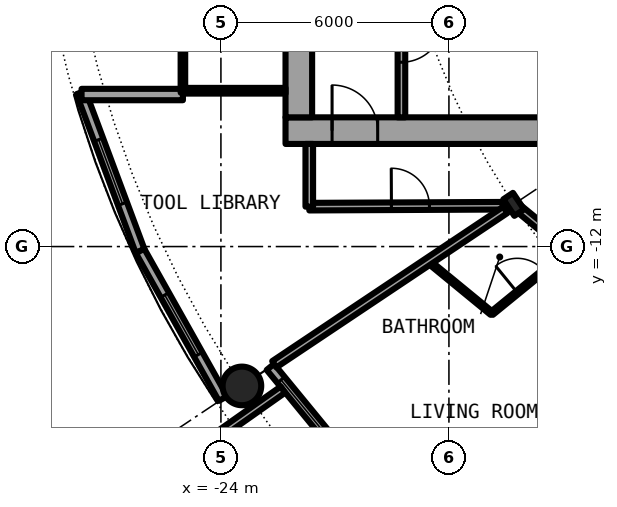
"""IFC4 building model, lengths in metres.
Left out: names, types, materials, properties, quantities, classifications, styles, units other than length and angle.
Written with IfcOpenShell. Run it as: python <this file> out.ifc"""

import sys

from ifc_helpers import new_model, si_unit, direction, frame, frame_2d, origin, origin_2d, place, context, subcontext, project, spatial, rectangle, hollow_circle, i_section, extrude, element, fill, save


model = new_model("IFC4")
c1 = context("Model", 3, precision=1e-05, world=origin(), true_north=direction((0.0, 1.0)))
c2 = subcontext(c1, "Body", "Model", "MODEL_VIEW")
j1 = project(units=[si_unit("LENGTHUNIT", "METRE"), si_unit("PLANEANGLEUNIT", "RADIAN")], contexts=[c1])
p1 = place(None, origin())
s1 = spatial("IfcSite", under=j1, at=p1, CompositionType="ELEMENT")
p2 = place(p1, origin())
s2 = spatial("IfcBuilding", under=s1, at=p2, CompositionType="ELEMENT")
p3 = place(p2, frame((0.0, 0.0, 72.75)))
s3 = spatial("IfcBuildingStorey", under=s2, at=p3, CompositionType="ELEMENT", Elevation=72.75)
p4 = place(p3, frame((-23.448, -15.667, 0.0), z_axis=(0.0, 0.0, 1.0), x_axis=(1.0, 0.0, 0.0)))
e1 = element("IfcColumn", 1, at=p4, inside=s3, PredefinedType="COLUMN", context=c2, shape_type="SweptSolid", body=[
    extrude(hollow_circle(Radius=0.508, WallThickness=0.04, at=origin_2d()), origin(), (0.0, 0.0, 1.0), 3.05),
])
p5 = place(p3, frame((-16.297, -10.889, 0.0), z_axis=(0.0, 0.0, 1.0), x_axis=(-0.831469612303, -0.55557023302, 0.0)))
e2 = element("IfcColumn", 2, at=p5, inside=s3, PredefinedType="COLUMN", context=c2, shape_type="SweptSolid", body=[
    extrude(i_section(OverallWidth=0.306, OverallDepth=0.524, WebThickness=0.021, FlangeThickness=0.04, FilletRadius=0.027, at=origin_2d()), origin(), (0.0, 0.0, 1.0), 3.05),
])
p6 = place(p3, frame((-22.699, -15.167, 0.0), z_axis=(0.0, 0.0, 1.0), x_axis=(0.634382322723, -0.773019449054, 0.0)))
e3 = element("IfcWall", 3, at=p6, inside=s3, PredefinedType="SOLIDWALL", context=c2, shape_type="SweptSolid", body=[
    extrude(rectangle(XDim=5.352, YDim=0.25, at=frame_2d((2.676, 0.0))), origin(), (0.0, 0.0, 1.0), 2.7),
])
p7 = place(p6, frame((0.441, 0.0, 0.3)))
e4 = element("IfcOpeningElement", 4, at=p7, cuts=e3, PredefinedType="OPENING", context=c2, shape_type="SweptSolid", body=[
    extrude(rectangle(XDim=1.8, YDim=2.1, at=frame_2d((0.9, 1.05))), frame((0.0, 0.135, 0.0), z_axis=(0.0, -1.0, 0.0), x_axis=(1.0, 0.0, 0.0)), (0.0, 0.0, 1.0), 0.27),
])
p8 = place(p6, frame((3.51, 0.0, 0.0)))
e5 = element("IfcOpeningElement", 5, at=p8, cuts=e3, PredefinedType="OPENING", context=c2, shape_type="SweptSolid", body=[
    extrude(rectangle(XDim=1.0, YDim=2.2, at=frame_2d((0.5, 1.1))), frame((0.0, 0.135, 0.0), z_axis=(0.0, -1.0, 0.0), x_axis=(1.0, 0.0, 0.0)), (0.0, 0.0, 1.0), 0.27),
])
p9 = place(p3, frame((-22.37, -15.765, -0.03), z_axis=(0.0, 0.0, 1.0), x_axis=(-0.817256123454, -0.576274612209, 0.0)))
e6 = element("IfcWall", 6, at=p9, inside=s3, PredefinedType="SOLIDWALL", context=c2, shape_type="SweptSolid", body=[
    extrude(rectangle(XDim=2.933, YDim=0.2, at=frame_2d((1.466, 0.0))), origin(), (0.0, 0.0, 1.0), 2.73),
])
p10 = place(p3, frame((-27.682, -7.945, 0.0), z_axis=(0.0, 0.0, 1.0), x_axis=(0.349247811493, -0.937030397675, 0.0)))
e7 = element("IfcWall", 7, at=p10, inside=s3, PredefinedType="SOLIDWALL", context=c2, shape_type="SweptSolid", body=[
    extrude(rectangle(XDim=4.452, YDim=0.25, at=frame_2d((2.226, 0.0))), origin(), (0.0, 0.0, 1.0), 2.7),
])
p11 = place(p10, frame((1.327, 0.0, 0.3)))
e8 = element("IfcOpeningElement", 8, at=p11, cuts=e7, PredefinedType="OPENING", context=c2, shape_type="SweptSolid", body=[
    extrude(rectangle(XDim=1.8, YDim=2.1, at=frame_2d((0.9, 1.05))), frame((0.0, 0.135, 0.0), z_axis=(0.0, -1.0, 0.0), x_axis=(1.0, 0.0, 0.0)), (0.0, 0.0, 1.0), 0.27),
])
p12 = place(p3, frame((-26.127, -12.117, 0.0), z_axis=(0.0, 0.0, 1.0), x_axis=(0.489696356642, -0.871893042919, 0.0)))
e9 = element("IfcWall", 9, at=p12, inside=s3, PredefinedType="SOLIDWALL", context=c2, shape_type="SweptSolid", body=[
    extrude(rectangle(XDim=4.454, YDim=0.25, at=frame_2d((2.227, 0.0))), origin(), (0.0, 0.0, 1.0), 2.7),
])
p13 = place(p12, frame((1.327, 0.0, 0.3)))
e10 = element("IfcOpeningElement", 10, at=p13, cuts=e9, PredefinedType="OPENING", context=c2, shape_type="SweptSolid", body=[
    extrude(rectangle(XDim=1.8, YDim=2.1, at=frame_2d((0.9, 1.05))), frame((0.0, 0.135, 0.0), z_axis=(0.0, -1.0, 0.0), x_axis=(1.0, 0.0, 0.0)), (0.0, 0.0, 1.0), 0.27),
])
p14 = place(p3, frame((-25.0, -8.0, 0.0), z_axis=(0.0, 0.0, 1.0), x_axis=(-1.0, 0.0, 0.0)))
e11 = element("IfcWall", 11, at=p14, inside=s3, PredefinedType="SOLIDWALL", context=c2, shape_type="SweptSolid", body=[
    extrude(rectangle(XDim=2.667, YDim=0.3, at=frame_2d((1.333, 0.0))), origin(), (0.0, 0.0, 1.0), 2.7),
])
p15 = place(p3, frame((-22.3, -8.95, 0.0), z_axis=(0.0, 0.0, 1.0), x_axis=(1.0, 0.0, 0.0)))
e12 = element("IfcWall", 12, at=p15, inside=s3, PredefinedType="SHEAR", context=c2, shape_type="SweptSolid", body=[
    extrude(rectangle(XDim=14.0, YDim=0.7, at=frame_2d((7.0, 0.0))), origin(), (0.0, 0.0, 1.0), 3.05),
])
p16 = place(p15, frame((1.225, 0.0, 0.0)))
e13 = element("IfcOpeningElement", 13, at=p16, cuts=e12, PredefinedType="OPENING", context=c2, shape_type="SweptSolid", body=[
    extrude(rectangle(XDim=1.2, YDim=2.3, at=frame_2d((0.6, 1.15))), frame((0.0, 0.36, 0.0), z_axis=(0.0, -1.0, 0.0), x_axis=(1.0, 0.0, 0.0)), (0.0, 0.0, 1.0), 0.72),
])
p17 = place(p3, frame((-21.95, -8.6, 0.0), z_axis=(0.0, 0.0, 1.0), x_axis=(0.0, 1.0, 0.0)))
e14 = element("IfcWall", 14, at=p17, inside=s3, PredefinedType="SHEAR", context=c2, shape_type="SweptSolid", body=[
    extrude(rectangle(XDim=17.2, YDim=0.7, at=frame_2d((8.6, 0.0))), origin(), (0.0, 0.0, 1.0), 3.05),
])
p18 = place(p17, frame((7.7, 0.0, 0.0)))
e15 = element("IfcOpeningElement", 15, at=p18, cuts=e14, PredefinedType="OPENING", context=c2, shape_type="SweptSolid", body=[
    extrude(rectangle(XDim=1.8, YDim=2.3, at=frame_2d((0.9, 1.15))), frame((0.0, 0.36, 0.0), z_axis=(0.0, -1.0, 0.0), x_axis=(1.0, 0.0, 0.0)), (0.0, 0.0, 1.0), 0.72),
])
p19 = place(p3, frame((-19.25, -1.575, 0.0), z_axis=(0.0, 0.0, 1.0), x_axis=(0.0, -1.0, 0.0)))
e16 = element("IfcWall", 16, at=p19, inside=s3, PredefinedType="SOLIDWALL", context=c2, shape_type="SweptSolid", body=[
    extrude(rectangle(XDim=7.025, YDim=0.2, at=frame_2d((3.513, 0.0))), origin(), (0.0, 0.0, 1.0), 2.7),
])
p20 = place(p19, frame((4.475, 0.0, 0.0)))
e17 = element("IfcOpeningElement", 17, at=p20, cuts=e16, PredefinedType="OPENING", context=c2, shape_type="SweptSolid", body=[
    extrude(rectangle(XDim=1.1, YDim=2.3, at=frame_2d((0.55, 1.15))), frame((0.0, 0.11, 0.0), z_axis=(0.0, -1.0, 0.0), x_axis=(1.0, 0.0, 0.0)), (0.0, 0.0, 1.0), 0.22),
])
p21 = place(p3, frame((-22.3, -7.9, 0.0), z_axis=(0.0, 0.0, 1.0), x_axis=(-1.0, 0.0, 0.0)))
e18 = element("IfcWall", 18, at=p21, inside=s3, PredefinedType="PARTITIONING", context=c2, shape_type="SweptSolid", body=[
    extrude(rectangle(XDim=2.64, YDim=0.15, at=frame_2d((1.32, 0.0))), origin(), (0.0, 0.0, 1.0), 2.7),
])
p22 = place(p3, frame((-25.0, 7.95, 0.0), z_axis=(0.0, 0.0, 1.0), x_axis=(0.0, -1.0, 0.0)))
e19 = element("IfcWall", 19, at=p22, inside=s3, PredefinedType="PARTITIONING", context=c2, shape_type="SweptSolid", body=[
    extrude(rectangle(XDim=15.9, YDim=0.12, at=frame_2d((7.95, 0.0))), origin(), (0.0, 0.0, 1.0), 2.7),
])
p23 = place(p22, frame((0.95, 0.0, 0.1)))
e20 = element("IfcOpeningElement", 20, at=p23, cuts=e19, PredefinedType="OPENING", context=c2, shape_type="SweptSolid", body=[
    extrude(rectangle(XDim=14.0, YDim=2.35, at=frame_2d((7.0, 1.175))), frame((0.0, 0.07, 0.0), z_axis=(0.0, -1.0, 0.0), x_axis=(1.0, 0.0, 0.0)), (0.0, 0.0, 1.0), 0.14),
])
p24 = place(p3, frame((-18.542, -12.389, 0.0), z_axis=(0.0, 0.0, 1.0), x_axis=(0.772948171844, -0.634469166818, 0.0)))
e21 = element("IfcWall", 21, at=p24, inside=s3, PredefinedType="PARTITIONING", context=c2, shape_type="SweptSolid", body=[
    extrude(rectangle(XDim=2.158, YDim=0.1, at=frame_2d((1.079, 0.0))), origin(), (0.0, 0.0, 1.0), 2.7),
])
p25 = place(p3, frame((-16.172, -10.99, 0.0), z_axis=(0.0, 0.0, 1.0), x_axis=(0.772669779479, -0.634808169355, 0.0)))
e22 = element("IfcWall", 22, at=p25, inside=s3, PredefinedType="PARTITIONING", context=c2, shape_type="SweptSolid", body=[
    extrude(rectangle(XDim=11.208, YDim=0.2, at=frame_2d((5.604, 0.0))), origin(), (0.0, 0.0, 1.0), 2.38),
])
p26 = place(p25, frame((3.135, 0.0, 0.0)))
e23 = element("IfcOpeningElement", 23, at=p26, cuts=e22, PredefinedType="OPENING", context=c2, shape_type="SweptSolid", body=[
    extrude(rectangle(XDim=1.0, YDim=2.3, at=frame_2d((0.5, 1.15))), frame((0.0, 0.11, 0.0), z_axis=(0.0, -1.0, 0.0), x_axis=(1.0, 0.0, 0.0)), (0.0, 0.0, 1.0), 0.22),
])
p27 = place(p3, frame((-21.675, -10.95, 0.0), z_axis=(0.0, 0.0, 1.0), x_axis=(0.999988944514, 0.004702217579, 0.0)))
e24 = element("IfcWall", 24, at=p27, inside=s3, PredefinedType="PARTITIONING", context=c2, shape_type="SweptSolid", body=[
    extrude(rectangle(XDim=5.088, YDim=0.2, at=frame_2d((2.544, 0.0))), origin(), (0.0, 0.0, 1.0), 2.7),
])
p28 = place(p27, frame((2.162, 0.0, 0.0)))
e25 = element("IfcOpeningElement", 25, at=p28, cuts=e24, PredefinedType="OPENING", context=c2, shape_type="SweptSolid", body=[
    extrude(rectangle(XDim=1.0, YDim=2.3, at=frame_2d((0.5, 1.15))), frame((0.0, 0.11, 0.0), z_axis=(0.0, -1.0, 0.0), x_axis=(1.0, 0.0, 0.0)), (0.0, 0.0, 1.0), 0.22),
])
p29 = place(p3, frame((-22.595, -15.097, 0.0), z_axis=(0.0, 0.0, 1.0), x_axis=(0.831505405283, 0.555516661303, 0.0)))
e26 = element("IfcWall", 26, at=p29, inside=s3, PredefinedType="PARTITIONING", context=c2, shape_type="SweptSolid", body=[
    extrude(rectangle(XDim=7.312, YDim=0.2, at=frame_2d((3.656, 0.0))), origin(), (0.0, 0.0, 1.0), 2.7),
])
p30 = place(p3, frame((-17.24, -21.007, 0.0), z_axis=(0.0, 0.0, 1.0), x_axis=(0.634396151441, 0.77300810024, 0.0)))
e27 = element("IfcWall", 27, at=p30, inside=s3, PredefinedType="PARTITIONING", context=c2, shape_type="SweptSolid", body=[
    extrude(rectangle(XDim=8.419, YDim=0.1, at=frame_2d((4.209, 0.0))), origin(), (0.0, 0.0, 1.0), 2.7),
])
p31 = place(p30, frame((6.679, 0.0, 0.0)))
e28 = element("IfcOpeningElement", 28, at=p31, cuts=e27, PredefinedType="OPENING", context=c2, shape_type="SweptSolid", body=[
    extrude(rectangle(XDim=0.9, YDim=2.3, at=frame_2d((0.45, 1.15))), frame((0.0, 0.06, 0.0), z_axis=(0.0, -1.0, 0.0), x_axis=(1.0, 0.0, 0.0)), (0.0, 0.0, 1.0), 0.12),
])
p32 = place(p30, frame((2.468, 0.0, 0.0)))
e29 = element("IfcOpeningElement", 29, at=p32, cuts=e27, PredefinedType="OPENING", context=c2, shape_type="SweptSolid", body=[
    extrude(rectangle(XDim=0.9, YDim=2.3, at=frame_2d((0.45, 1.15))), frame((0.0, 0.06, 0.0), z_axis=(0.0, -1.0, 0.0), x_axis=(1.0, 0.0, 0.0)), (0.0, 0.0, 1.0), 0.12),
])
p33 = place(p3, frame((-16.874, -13.758, 0.0), z_axis=(0.0, 0.0, 1.0), x_axis=(0.774979608522, 0.631986239072, 0.0)))
e30 = element("IfcWall", 30, at=p33, inside=s3, PredefinedType="PARTITIONING", context=c2, shape_type="SweptSolid", body=[
    extrude(rectangle(XDim=2.636, YDim=0.1, at=frame_2d((1.318, 0.0))), origin(), (0.0, 0.0, 1.0), 2.7),
])
p34 = place(p33, frame((0.868, 0.0, 0.0)))
e31 = element("IfcOpeningElement", 31, at=p34, cuts=e30, PredefinedType="OPENING", context=c2, shape_type="SweptSolid", body=[
    extrude(rectangle(XDim=0.9, YDim=2.3, at=frame_2d((0.45, 1.15))), frame((0.0, 0.06, 0.0), z_axis=(0.0, -1.0, 0.0), x_axis=(1.0, 0.0, 0.0)), (0.0, 0.0, 1.0), 0.12),
])
p35 = place(p3, frame((-21.675, -10.95, 0.0), z_axis=(0.0, 0.0, 1.0), x_axis=(0.0, 1.0, 0.0)))
e32 = element("IfcWall", 32, at=p35, inside=s3, PredefinedType="PARTITIONING", context=c2, shape_type="SweptSolid", body=[
    extrude(rectangle(XDim=1.65, YDim=0.2, at=frame_2d((0.825, 0.0))), origin(), (0.0, 0.0, 1.0), 2.7),
])
p36 = place(p7, origin())
e33 = element("IfcWindow", 33, at=p36, inside=s3, PartitioningType="SINGLE_PANEL", PredefinedType="WINDOW", context=c2, shape_type="SweptSolid", body=[
    extrude(rectangle(XDim=1.8, YDim=2.1, at=frame_2d((0.9, 1.05))), frame((0.0, 0.03, 0.0), z_axis=(0.0, -1.0, 0.0), x_axis=(1.0, 0.0, 0.0)), (0.0, 0.0, 1.0), 0.06),
])
fill(e4, e33)
p37 = place(p11, origin())
e34 = element("IfcWindow", 34, at=p37, inside=s3, PartitioningType="SINGLE_PANEL", PredefinedType="WINDOW", context=c2, shape_type="SweptSolid", body=[
    extrude(rectangle(XDim=1.8, YDim=2.1, at=frame_2d((0.9, 1.05))), frame((0.0, 0.03, 0.0), z_axis=(0.0, -1.0, 0.0), x_axis=(1.0, 0.0, 0.0)), (0.0, 0.0, 1.0), 0.06),
])
fill(e8, e34)
p38 = place(p13, origin())
e35 = element("IfcWindow", 35, at=p38, inside=s3, PartitioningType="SINGLE_PANEL", PredefinedType="WINDOW", context=c2, shape_type="SweptSolid", body=[
    extrude(rectangle(XDim=1.8, YDim=2.1, at=frame_2d((0.9, 1.05))), frame((0.0, 0.03, 0.0), z_axis=(0.0, -1.0, 0.0), x_axis=(1.0, 0.0, 0.0)), (0.0, 0.0, 1.0), 0.06),
])
fill(e10, e35)
p39 = place(p20, origin())
e36 = element("IfcDoor", 36, at=p39, inside=s3, OperationType="SINGLE_SWING_LEFT", PredefinedType="DOOR", context=c2, shape_type="SweptSolid", body=[
    extrude(rectangle(XDim=1.1, YDim=2.3, at=frame_2d((0.55, 1.15))), frame((0.0, 0.025, 0.0), z_axis=(0.0, -1.0, 0.0), x_axis=(1.0, 0.0, 0.0)), (0.0, 0.0, 1.0), 0.05),
])
fill(e17, e36)
p40 = place(p16, origin())
e37 = element("IfcDoor", 37, at=p40, inside=s3, OperationType="SINGLE_SWING_RIGHT", PredefinedType="DOOR", context=c2, shape_type="SweptSolid", body=[
    extrude(rectangle(XDim=1.2, YDim=2.3, at=frame_2d((0.6, 1.15))), frame((0.0, 0.025, 0.0), z_axis=(0.0, -1.0, 0.0), x_axis=(1.0, 0.0, 0.0)), (0.0, 0.0, 1.0), 0.05),
])
fill(e13, e37)
p41 = place(p23, origin())
e38 = element("IfcWindow", 38, at=p41, inside=s3, PartitioningType="SINGLE_PANEL", PredefinedType="WINDOW", context=c2, shape_type="SweptSolid", body=[
    extrude(rectangle(XDim=14.0, YDim=2.35, at=frame_2d((7.0, 1.175))), frame((0.0, 0.03, 0.0), z_axis=(0.0, -1.0, 0.0), x_axis=(1.0, 0.0, 0.0)), (0.0, 0.0, 1.0), 0.06),
])
fill(e20, e38)
p42 = place(p34, origin())
e39 = element("IfcDoor", 39, at=p42, inside=s3, OperationType="SINGLE_SWING_LEFT", PredefinedType="DOOR", context=c2, shape_type="SweptSolid", body=[
    extrude(rectangle(XDim=0.9, YDim=2.3, at=frame_2d((0.45, 1.15))), frame((0.0, 0.025, 0.0), z_axis=(0.0, -1.0, 0.0), x_axis=(1.0, 0.0, 0.0)), (0.0, 0.0, 1.0), 0.05),
])
fill(e31, e39)
p43 = place(p28, origin())
e40 = element("IfcDoor", 40, at=p43, inside=s3, OperationType="SINGLE_SWING_RIGHT", PredefinedType="DOOR", context=c2, shape_type="SweptSolid", body=[
    extrude(rectangle(XDim=1.0, YDim=2.3, at=frame_2d((0.5, 1.15))), frame((0.0, 0.025, 0.0), z_axis=(0.0, -1.0, 0.0), x_axis=(1.0, 0.0, 0.0)), (0.0, 0.0, 1.0), 0.05),
])
fill(e25, e40)
save(model, sys.argv[1])
